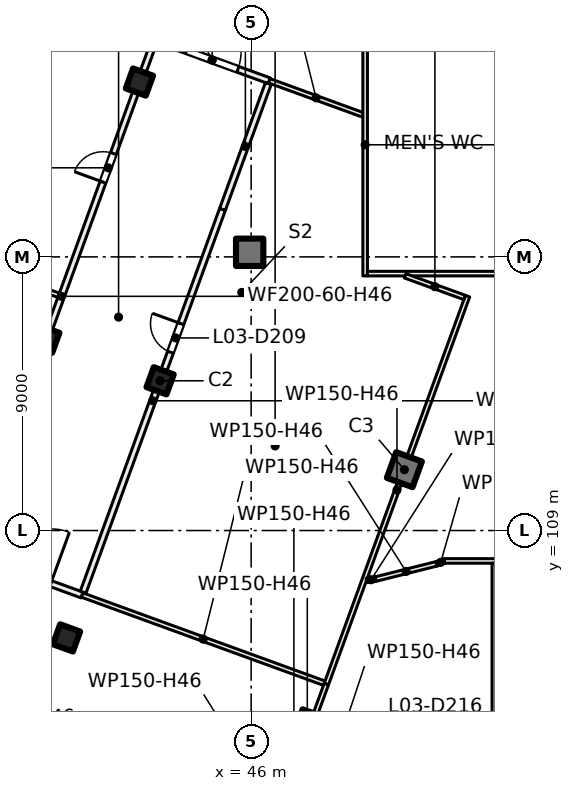
"""IFC4 building model, lengths in metres.
Left out: names, types, materials, properties, quantities, classifications, styles, units other than length and angle.
Written with IfcOpenShell. Run it as: python <this file> out.ifc"""

import sys

from ifc_helpers import new_model, si_unit, direction, frame, frame_2d, origin, origin_2d, place, context, subcontext, project, spatial, rectangle, extrude, element, fill, save


model = new_model("IFC4")
c1 = context("Model", 3, precision=1e-05, world=origin(), true_north=direction((0.0, 1.0)))
c2 = subcontext(c1, "Body", "Model", "MODEL_VIEW")
j1 = project(units=[si_unit("LENGTHUNIT", "METRE"), si_unit("PLANEANGLEUNIT", "RADIAN")], contexts=[c1])
p1 = place(None, origin())
s1 = spatial("IfcSite", under=j1, at=p1, CompositionType="ELEMENT")
p2 = place(p1, origin())
s2 = spatial("IfcBuilding", under=s1, at=p2, CompositionType="ELEMENT")
p3 = place(p2, frame((0.0, 0.0, 17.5)))
s3 = spatial("IfcBuildingStorey", under=s2, at=p3, CompositionType="ELEMENT", Elevation=17.5)
p4 = place(p3, frame((45.952, 118.152, 0.0), z_axis=(0.0, 0.0, 1.0), x_axis=(1.0, 0.0, 0.0)))
e1 = element("IfcColumn", 1, at=p4, inside=s3, PredefinedType="COLUMN", context=c2, shape_type="SweptSolid", body=[
    extrude(rectangle(XDim=0.9, YDim=0.9, at=origin_2d()), origin(), (0.0, 0.0, 1.0), 5.0),
])
for number, where, z_axis, x_axis in (
    (2, (43.006, 113.925, 0.0), (0.0, 0.0, 1.0), (-0.342, -0.94, 0.0)),
    (3, (39.927, 105.468, 0.0), (0.0, 0.0, 1.0), (-0.342, -0.94, 0.0)),
    (4, (42.325, 123.751, 0.0), (0.0, 0.0, 1.0), (-0.342, -0.94, 0.0)),
    (5, (39.247, 115.293, 0.0), (0.0, 0.0, 1.0), (-0.342, -0.94, 0.0)),
):
    element("IfcColumn", number, at=place(p3, frame(where, z_axis=z_axis, x_axis=x_axis)), inside=s3, PredefinedType="COLUMN", context=c2, shape_type="SweptSolid", body=[
        extrude(rectangle(XDim=0.7, YDim=0.7, at=origin_2d()), origin(), (0.0, 0.0, 1.0), 5.0),
    ])
for number, where, z_axis, x_axis in (
    (6, (51.04, 111.001, 0.0), (0.0, 0.0, 1.0), (-0.342, -0.94, 0.0)),
    (7, (47.962, 102.544, 0.0), (0.0, 0.0, 1.0), (-0.342, -0.94, 0.0)),
):
    element("IfcColumn", number, at=place(p3, frame(where, z_axis=z_axis, x_axis=x_axis)), inside=s3, PredefinedType="COLUMN", context=c2, shape_type="SweptSolid", body=[
        extrude(rectangle(XDim=0.9, YDim=0.9, at=origin_2d()), origin(), (0.0, 0.0, 1.0), 5.0),
    ])
p5 = place(p3, frame((31.795, 119.601, 0.0), z_axis=(0.0, 0.0, 1.0), x_axis=(0.93972447093, -0.341932623092, 0.0)))
e8 = element("IfcWall", 8, at=p5, inside=s3, PredefinedType="PARTITIONING", context=c2, shape_type="SweptSolid", body=[
    extrude(rectangle(XDim=8.376, YDim=0.15, at=frame_2d((4.188, 0.0))), origin(), (0.0, 0.0, 1.0), 4.6),
])
p6 = place(p3, frame((40.44, 106.878, 0.0), z_axis=(0.0, 0.0, 1.0), x_axis=(-0.939665029144, 0.342095941228, 0.0)))
e9 = element("IfcWall", 9, at=p6, inside=s3, PredefinedType="PARTITIONING", context=c2, shape_type="SweptSolid", body=[
    extrude(rectangle(XDim=3.999, YDim=0.2, at=frame_2d((2.0, 0.0))), origin(), (0.0, 0.0, 1.0), 4.6),
])
p7 = place(p6, frame((1.099, 0.0, 0.0)))
e10 = element("IfcOpeningElement", 10, at=p7, cuts=e9, PredefinedType="OPENING", context=c2, shape_type="SweptSolid", body=[
    extrude(rectangle(XDim=1.8, YDim=2.1, at=frame_2d((0.9, 1.05))), frame((0.0, 0.11, 0.0), z_axis=(0.0, -1.0, 0.0), x_axis=(1.0, 0.0, 0.0)), (0.0, 0.0, 1.0), 0.22),
])
p8 = place(p3, frame((36.716, 108.34, 0.0), z_axis=(0.0, 0.0, 1.0), x_axis=(0.342029387276, 0.939689256212, 0.0)))
e11 = element("IfcWall", 11, at=p8, inside=s3, PredefinedType="PARTITIONING", context=c2, shape_type="SweptSolid", body=[
    extrude(rectangle(XDim=17.799, YDim=0.2, at=frame_2d((8.9, 0.0))), origin(), (0.0, 0.0, 1.0), 4.6),
])
p9 = place(p8, frame((3.902, 0.0, 0.0)))
e12 = element("IfcOpeningElement", 12, at=p9, cuts=e11, PredefinedType="OPENING", context=c2, shape_type="SweptSolid", body=[
    extrude(rectangle(XDim=1.0, YDim=2.1, at=frame_2d((0.5, 1.05))), frame((0.0, 0.11, 0.0), z_axis=(0.0, -1.0, 0.0), x_axis=(1.0, 0.0, 0.0)), (0.0, 0.0, 1.0), 0.22),
])
p10 = place(p8, frame((12.898, 0.0, 0.0)))
e13 = element("IfcOpeningElement", 13, at=p10, cuts=e11, PredefinedType="OPENING", context=c2, shape_type="SweptSolid", body=[
    extrude(rectangle(XDim=1.0, YDim=2.1, at=frame_2d((0.5, 1.05))), frame((0.0, 0.11, 0.0), z_axis=(0.0, -1.0, 0.0), x_axis=(1.0, 0.0, 0.0)), (0.0, 0.0, 1.0), 0.22),
])
p11 = place(p3, frame((45.058, 119.563, 0.0), z_axis=(0.0, 0.0, 1.0), x_axis=(-0.342099992172, -0.93966355434, 0.0)))
e14 = element("IfcWall", 14, at=p11, inside=s3, PredefinedType="PARTITIONING", context=c2, shape_type="SweptSolid", body=[
    extrude(rectangle(XDim=13.4, YDim=0.2, at=frame_2d((6.7, 0.0))), origin(), (0.0, 0.0, 1.0), 4.6),
])
p12 = place(p11, frame((4.0, 0.0, 0.0)))
e15 = element("IfcOpeningElement", 15, at=p12, cuts=e14, PredefinedType="OPENING", context=c2, shape_type="SweptSolid", body=[
    extrude(rectangle(XDim=1.0, YDim=2.1, at=frame_2d((0.5, 1.05))), frame((0.0, 0.11, 0.0), z_axis=(0.0, -1.0, 0.0), x_axis=(1.0, 0.0, 0.0)), (0.0, 0.0, 1.0), 0.22),
])
p13 = place(p3, frame((40.44, 106.878, 0.0), z_axis=(0.0, 0.0, 1.0), x_axis=(0.939697516706, -0.342006691597, 0.0)))
e16 = element("IfcWall", 16, at=p13, inside=s3, PredefinedType="PARTITIONING", context=c2, shape_type="SweptSolid", body=[
    extrude(rectangle(XDim=8.476, YDim=0.15, at=frame_2d((4.238, 0.0))), origin(), (0.0, 0.0, 1.0), 4.6),
])
p14 = place(p3, frame((42.838, 125.16, 0.0), z_axis=(0.0, 0.0, 1.0), x_axis=(0.939713209288, -0.341963571582, 0.0)))
e17 = element("IfcWall", 17, at=p14, inside=s3, PredefinedType="PARTITIONING", context=c2, shape_type="SweptSolid", body=[
    extrude(rectangle(XDim=4.0, YDim=0.2, at=frame_2d((2.0, 0.0))), origin(), (0.0, 0.0, 1.0), 4.6),
])
p15 = place(p14, frame((1.1, 0.0, 0.0)))
e18 = element("IfcOpeningElement", 18, at=p15, cuts=e17, PredefinedType="OPENING", context=c2, shape_type="SweptSolid", body=[
    extrude(rectangle(XDim=1.8, YDim=2.1, at=frame_2d((0.9, 1.05))), frame((0.0, 0.11, 0.0), z_axis=(0.0, -1.0, 0.0), x_axis=(1.0, 0.0, 0.0)), (0.0, 0.0, 1.0), 0.22),
])
p16 = place(p3, frame((45.058, 119.563, 0.0), z_axis=(0.0, 0.0, 1.0), x_axis=(0.34199251863, 0.939702674893, 0.0)))
e19 = element("IfcWall", 19, at=p16, inside=s3, PredefinedType="PARTITIONING", context=c2, shape_type="SweptSolid", body=[
    extrude(rectangle(XDim=4.4, YDim=0.2, at=frame_2d((2.2, 0.0))), origin(), (0.0, 0.0, 1.0), 4.6),
])
p17 = place(p3, frame((46.337, 98.08, 0.0), z_axis=(0.0, 0.0, 1.0), x_axis=(0.342113136459, 0.939658768842, 0.0)))
e20 = element("IfcWall", 20, at=p17, inside=s3, PredefinedType="PARTITIONING", context=c2, shape_type="SweptSolid", body=[
    extrude(rectangle(XDim=6.25, YDim=0.15, at=frame_2d((3.125, 0.0))), origin(), (0.0, 0.0, 1.0), 4.6),
])
p18 = place(p3, frame((46.597, 123.792, 0.0), z_axis=(0.0, 0.0, 1.0), x_axis=(0.939619227089, -0.342221723572, 0.0)))
e21 = element("IfcWall", 21, at=p18, inside=s3, PredefinedType="PARTITIONING", context=c2, shape_type="SweptSolid", body=[
    extrude(rectangle(XDim=3.276, YDim=0.15, at=frame_2d((1.638, 0.0))), origin(), (0.0, 0.0, 1.0), 4.6),
])
p19 = place(p3, frame((48.475, 103.953, 0.0), z_axis=(0.0, 0.0, 1.0), x_axis=(0.342018860609, 0.939693087656, 0.0)))
e22 = element("IfcWall", 22, at=p19, inside=s3, PredefinedType="PARTITIONING", context=c2, shape_type="SweptSolid", body=[
    extrude(rectangle(XDim=13.575, YDim=0.15, at=frame_2d((6.787, 0.0))), origin(), (0.0, 0.0, 1.0), 4.6),
])
p20 = place(p3, frame((49.794, 107.359, 0.0), z_axis=(0.0, 0.0, 1.0), x_axis=(0.988901730308, 0.148571086668, 0.0)))
e23 = element("IfcWall", 23, at=p20, inside=s3, PredefinedType="PARTITIONING", context=c2, shape_type="SweptSolid", body=[
    extrude(rectangle(XDim=0.311, YDim=0.15, at=frame_2d((0.155, 0.0))), origin(), (0.0, 0.0, 1.0), 4.6),
])
p21 = place(p3, frame((49.75, 117.375, 0.0), z_axis=(0.0, 0.0, 1.0), x_axis=(0.0, 1.0, 0.0)))
e24 = element("IfcWall", 24, at=p21, inside=s3, PredefinedType="PARTITIONING", context=c2, shape_type="SweptSolid", body=[
    extrude(rectangle(XDim=8.625, YDim=0.15, at=frame_2d((4.312, 0.0))), origin(), (0.0, 0.0, 1.0), 4.6),
])
p22 = place(p3, frame((49.825, 117.45, 0.0), z_axis=(0.0, 0.0, 1.0), x_axis=(1.0, 0.0, 0.0)))
e25 = element("IfcWall", 25, at=p22, inside=s3, PredefinedType="PARTITIONING", context=c2, shape_type="SweptSolid", body=[
    extrude(rectangle(XDim=17.675, YDim=0.15, at=frame_2d((8.837, 0.0))), origin(), (0.0, 0.0, 1.0), 4.6),
])
p23 = place(p3, frame((50.093, 107.403, 0.0), z_axis=(0.0, 0.0, 1.0), x_axis=(0.970121672102, 0.24261892201, 0.0)))
e26 = element("IfcWall", 26, at=p23, inside=s3, PredefinedType="PARTITIONING", context=c2, shape_type="SweptSolid", body=[
    extrude(rectangle(XDim=2.069, YDim=0.15, at=frame_2d((1.034, 0.0))), origin(), (0.0, 0.0, 1.0), 4.6),
])
p24 = place(p3, frame((51.066, 117.377, 0.0), z_axis=(0.0, 0.0, 1.0), x_axis=(0.939697502841, -0.342006729691, 0.0)))
e27 = element("IfcWall", 27, at=p24, inside=s3, PredefinedType="PARTITIONING", context=c2, shape_type="SweptSolid", body=[
    extrude(rectangle(XDim=2.082, YDim=0.15, at=frame_2d((1.041, 0.0))), origin(), (0.0, 0.0, 1.0), 4.6),
])
p25 = place(p3, frame((52.093, 107.903, 0.0), z_axis=(0.0, 0.0, 1.0), x_axis=(0.941980718737, 0.335666986056, 0.0)))
e28 = element("IfcWall", 28, at=p25, inside=s3, PredefinedType="PARTITIONING", context=c2, shape_type="SweptSolid", body=[
    extrude(rectangle(XDim=0.3, YDim=0.15, at=frame_2d((0.15, 0.0))), origin(), (0.0, 0.0, 1.0), 4.6),
])
p26 = place(p3, frame((52.351, 108.0, 0.0), z_axis=(0.0, 0.0, 1.0), x_axis=(1.0, 0.0, 0.0)))
e29 = element("IfcWall", 29, at=p26, inside=s3, PredefinedType="PARTITIONING", context=c2, shape_type="SweptSolid", body=[
    extrude(rectangle(XDim=6.509, YDim=0.15, at=frame_2d((3.254, 0.0))), origin(), (0.0, 0.0, 1.0), 3.6),
])
p27 = place(p3, frame((54.0, 107.925, 0.0), z_axis=(0.0, 0.0, 1.0), x_axis=(0.0, -1.0, 0.0)))
e30 = element("IfcWall", 30, at=p27, inside=s3, PredefinedType="PARTITIONING", context=c2, shape_type="SweptSolid", body=[
    extrude(rectangle(XDim=13.29, YDim=0.15, at=frame_2d((6.645, 0.0))), origin(), (0.0, 0.0, 1.0), 3.6),
])
p28 = place(p27, frame((6.175, 0.0, 0.0)))
e31 = element("IfcOpeningElement", 31, at=p28, cuts=e30, PredefinedType="OPENING", context=c2, shape_type="SweptSolid", body=[
    extrude(rectangle(XDim=1.0, YDim=2.1, at=frame_2d((0.5, 1.05))), frame((0.0, 0.085, 0.0), z_axis=(0.0, -1.0, 0.0), x_axis=(1.0, 0.0, 0.0)), (0.0, 0.0, 1.0), 0.17),
])
p29 = place(p3, frame((54.026, 94.5, 0.0), z_axis=(0.0, 0.0, 1.0), x_axis=(0.342084382251, 0.939669237243, 0.0)))
e32 = element("IfcWall", 32, at=p29, inside=s3, PredefinedType="PARTITIONING", context=c2, shape_type="SweptSolid", body=[
    extrude(rectangle(XDim=15.506, YDim=0.15, at=frame_2d((7.753, 0.0))), origin(), (0.0, 0.0, 1.0), 3.6),
])
p30 = place(p29, frame((4.684, 0.0, 0.0)))
e33 = element("IfcOpeningElement", 33, at=p30, cuts=e32, PredefinedType="OPENING", context=c2, shape_type="SweptSolid", body=[
    extrude(rectangle(XDim=2.0, YDim=2.1, at=frame_2d((1.0, 1.05))), frame((0.0, 0.085, 0.0), z_axis=(0.0, -1.0, 0.0), x_axis=(1.0, 0.0, 0.0)), (0.0, 0.0, 1.0), 0.17),
])
p31 = place(p10, origin())
e34 = element("IfcDoor", 34, at=p31, inside=s3, OperationType="SINGLE_SWING_LEFT", PredefinedType="DOOR", context=c2, shape_type="SweptSolid", body=[
    extrude(rectangle(XDim=1.0, YDim=2.1, at=frame_2d((0.5, 1.05))), frame((0.0, 0.025, 0.0), z_axis=(0.0, -1.0, 0.0), x_axis=(1.0, 0.0, 0.0)), (0.0, 0.0, 1.0), 0.05),
])
fill(e13, e34)
p32 = place(p12, origin())
e35 = element("IfcDoor", 35, at=p32, inside=s3, OperationType="SINGLE_SWING_LEFT", PredefinedType="DOOR", context=c2, shape_type="SweptSolid", body=[
    extrude(rectangle(XDim=1.0, YDim=2.1, at=frame_2d((0.5, 1.05))), frame((0.0, 0.025, 0.0), z_axis=(0.0, -1.0, 0.0), x_axis=(1.0, 0.0, 0.0)), (0.0, 0.0, 1.0), 0.05),
])
fill(e15, e35)
p33 = place(p15, origin())
e36 = element("IfcDoor", 36, at=p33, inside=s3, OperationType="DOUBLE_DOOR_SINGLE_SWING", PredefinedType="DOOR", context=c2, shape_type="SweptSolid", body=[
    extrude(rectangle(XDim=1.8, YDim=2.1, at=frame_2d((0.9, 1.05))), frame((0.0, 0.025, 0.0), z_axis=(0.0, -1.0, 0.0), x_axis=(1.0, 0.0, 0.0)), (0.0, 0.0, 1.0), 0.05),
])
fill(e18, e36)
save(model, sys.argv[1])
